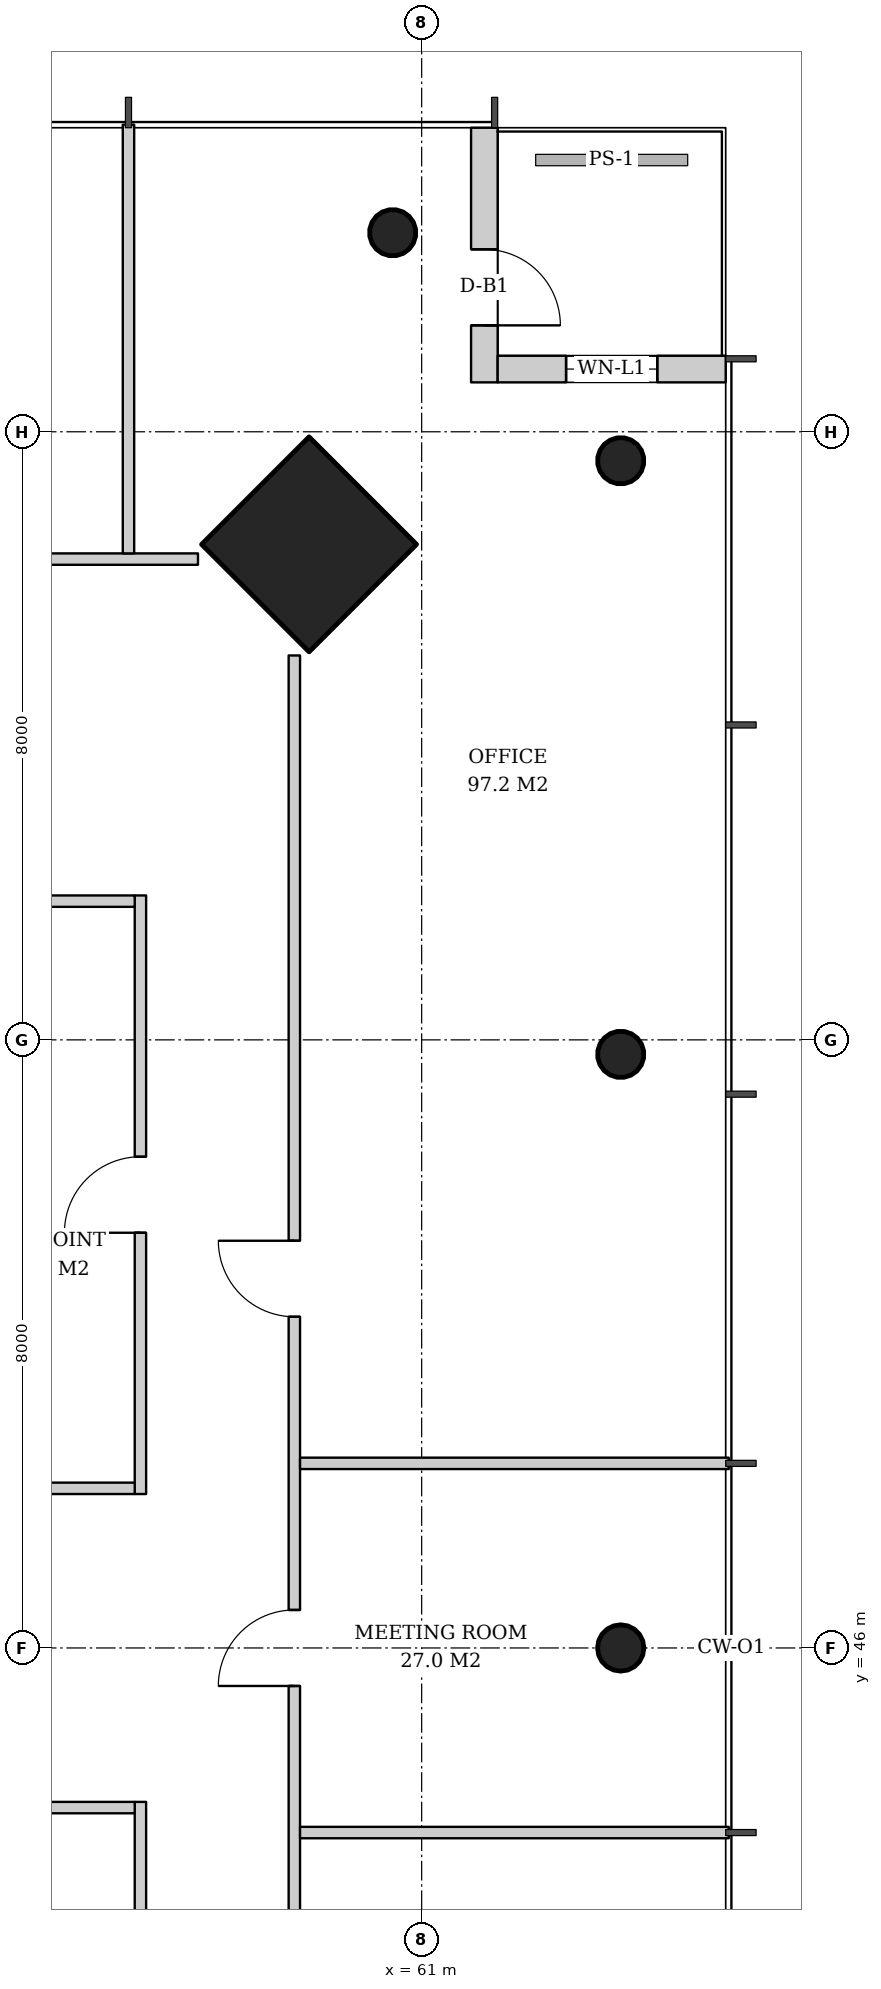
"""IFC4 building model, lengths in metres.
Left out: names, types, materials, properties, quantities, classifications, styles, units other than length and angle.
Written with IfcOpenShell. Run it as: python <this file> out.ifc"""

import sys

from ifc_helpers import new_model, si_unit, direction, frame, frame_2d, origin, origin_2d, place, context, subcontext, project, spatial, rectangle, hollow_circle, extrude, element, fill, save


model = new_model("IFC4")
c1 = context("Model", 3, precision=1e-05, world=origin(), true_north=direction((0.0, 1.0)))
c2 = subcontext(c1, "Body", "Model", "MODEL_VIEW")
j1 = project(units=[si_unit("LENGTHUNIT", "METRE"), si_unit("PLANEANGLEUNIT", "RADIAN")], contexts=[c1])
p1 = place(None, origin())
s1 = spatial("IfcSite", under=j1, at=p1, CompositionType="ELEMENT")
p2 = place(p1, origin())
s2 = spatial("IfcBuilding", under=s1, at=p2, CompositionType="ELEMENT")
p3 = place(p2, frame((0.0, 0.0, 188.2)))
s3 = spatial("IfcBuildingStorey", under=s2, at=p3, CompositionType="ELEMENT", Elevation=188.2)
p4 = place(p3, frame((59.557, 60.557, 0.0), z_axis=(-0.031898107953, -0.031898107953, 0.998981992539), x_axis=(0.707106781187, -0.707106781187, 0.0)))
e1 = element("IfcColumn", 1, at=p4, inside=s3, PredefinedType="COLUMN", context=c2, shape_type="SweptSolid", body=[
    extrude(rectangle(XDim=2.0, YDim=2.0, at=origin_2d()), origin(), (0.0, 0.0, 1.0), 3.804),
])
p5 = place(p3, frame((63.657, 61.657, 0.0), z_axis=(-0.031962158256, -0.031962158256, 0.998977898093), x_axis=(0.707106781187, -0.707106781187, 0.0)))
e2 = element("IfcColumn", 2, at=p5, inside=s3, PredefinedType="COLUMN", context=c2, shape_type="SweptSolid", body=[
    extrude(hollow_circle(Radius=0.305, WallThickness=0.025, at=origin_2d()), origin(), (0.0, 0.0, 1.0), 3.804),
])
p6 = place(p3, frame((63.657, 46.0, 0.0), z_axis=(-0.031978496719, 0.0, 0.999488557087), x_axis=(0.0, -1.0, 0.0)))
e3 = element("IfcColumn", 3, at=p6, inside=s3, PredefinedType="COLUMN", context=c2, shape_type="SweptSolid", body=[
    extrude(hollow_circle(Radius=0.305, WallThickness=0.025, at=origin_2d()), origin(), (0.0, 0.0, 1.0), 3.802),
])
p7 = place(p3, frame((63.657, 53.829, 0.0), z_axis=(-0.031974409754, -0.015987204877, 0.999360818924), x_axis=(0.4472135955, -0.894427191, 0.0)))
e4 = element("IfcColumn", 4, at=p7, inside=s3, PredefinedType="COLUMN", context=c2, shape_type="SweptSolid", body=[
    extrude(hollow_circle(Radius=0.305, WallThickness=0.025, at=origin_2d()), origin(), (0.0, 0.0, 1.0), 3.802),
])
p8 = place(p3, frame((60.657, 64.657, 0.0), z_axis=(-0.031962158256, -0.031962158256, 0.998977898093), x_axis=(0.707106781187, -0.707106781187, 0.0)))
e5 = element("IfcColumn", 5, at=p8, inside=s3, PredefinedType="COLUMN", context=c2, shape_type="SweptSolid", body=[
    extrude(hollow_circle(Radius=0.305, WallThickness=0.025, at=origin_2d()), origin(), (0.0, 0.0, 1.0), 3.804),
])
p9 = place(p3, frame((61.825, 66.0, 0.0), z_axis=(0.0, 0.0, 1.0), x_axis=(0.0, -1.0, 0.0)))
e6 = element("IfcWall", 6, at=p9, inside=s3, PredefinedType="SOLIDWALL", context=c2, shape_type="SweptSolid", body=[
    extrude(rectangle(XDim=3.35, YDim=0.35, at=frame_2d((1.675, 0.0))), origin(), (0.0, 0.0, 1.0), 3.62),
])
p10 = place(p9, frame((1.6, 0.0, 0.0)))
e7 = element("IfcOpeningElement", 7, at=p10, cuts=e6, PredefinedType="OPENING", context=c2, shape_type="SweptSolid", body=[
    extrude(rectangle(XDim=1.0, YDim=2.4, at=frame_2d((0.5, 1.2))), frame((0.0, 0.185, 0.0), z_axis=(0.0, -1.0, 0.0), x_axis=(1.0, 0.0, 0.0)), (0.0, 0.0, 1.0), 0.37),
])
p11 = place(p3, frame((62.0, 62.825, 0.0), z_axis=(0.0, 0.0, 1.0), x_axis=(1.0, 0.0, 0.0)))
e8 = element("IfcWall", 8, at=p11, inside=s3, PredefinedType="SOLIDWALL", context=c2, shape_type="SweptSolid", body=[
    extrude(rectangle(XDim=3.0, YDim=0.35, at=frame_2d((1.5, 0.0))), origin(), (0.0, 0.0, 1.0), 3.62),
])
p12 = place(p11, frame((0.9, 0.0, 0.6)))
e9 = element("IfcOpeningElement", 9, at=p12, cuts=e8, PredefinedType="OPENING", context=c2, shape_type="SweptSolid", body=[
    extrude(rectangle(XDim=1.2, YDim=2.55, at=frame_2d((0.6, 1.275))), frame((0.0, 0.185, 0.0), z_axis=(0.0, -1.0, 0.0), x_axis=(1.0, 0.0, 0.0)), (0.0, 0.0, 1.0), 0.37),
])
p13 = place(p3, frame((57.3, 36.1, 0.0), z_axis=(0.0, 0.0, 1.0), x_axis=(0.0, 1.0, 0.0)))
e10 = element("IfcWall", 10, at=p13, inside=s3, PredefinedType="PARTITIONING", context=c2, shape_type="SweptSolid", body=[
    extrude(rectangle(XDim=7.875, YDim=0.15, at=frame_2d((3.938, 0.0))), origin(), (0.0, 0.0, 1.0), 2.867),
])
p14 = place(p13, frame((3.438, 0.0, 0.0)))
e11 = element("IfcOpeningElement", 11, at=p14, cuts=e10, PredefinedType="OPENING", context=c2, shape_type="SweptSolid", body=[
    extrude(rectangle(XDim=1.0, YDim=2.1, at=frame_2d((0.5, 1.05))), frame((0.0, 0.085, 0.0), z_axis=(0.0, -1.0, 0.0), x_axis=(1.0, 0.0, 0.0)), (0.0, 0.0, 1.0), 0.17),
])
p15 = place(p3, frame((54.9, 43.9, 0.0), z_axis=(0.0, 0.0, 1.0), x_axis=(1.0, 0.0, 0.0)))
e12 = element("IfcWall", 12, at=p15, inside=s3, PredefinedType="PARTITIONING", context=c2, shape_type="SweptSolid", body=[
    extrude(rectangle(XDim=2.325, YDim=0.15, at=frame_2d((1.163, 0.0))), origin(), (0.0, 0.0, 1.0), 3.62),
])
p16 = place(p3, frame((57.3, 48.025, 0.0), z_axis=(0.0, 0.0, 1.0), x_axis=(0.0, 1.0, 0.0)))
e13 = element("IfcWall", 13, at=p16, inside=s3, PredefinedType="PARTITIONING", context=c2, shape_type="SweptSolid", body=[
    extrude(rectangle(XDim=7.875, YDim=0.15, at=frame_2d((3.938, 0.0))), origin(), (0.0, 0.0, 1.0), 2.867),
])
p17 = place(p16, frame((3.438, 0.0, 0.0)))
e14 = element("IfcOpeningElement", 14, at=p17, cuts=e13, PredefinedType="OPENING", context=c2, shape_type="SweptSolid", body=[
    extrude(rectangle(XDim=1.0, YDim=2.1, at=frame_2d((0.5, 1.05))), frame((0.0, 0.085, 0.0), z_axis=(0.0, -1.0, 0.0), x_axis=(1.0, 0.0, 0.0)), (0.0, 0.0, 1.0), 0.17),
])
for number, where, z_axis, x_axis in (
    (15, (54.9, 48.1, 0.0), (0.0, 0.0, 1.0), (1.0, 0.0, 0.0)),
    (16, (54.9, 55.825, 0.0), (0.0, 0.0, 1.0), (1.0, 0.0, 0.0)),
):
    element("IfcWall", number, at=place(p3, frame(where, z_axis=z_axis, x_axis=x_axis)), inside=s3, PredefinedType="PARTITIONING", context=c2, shape_type="SweptSolid", body=[
        extrude(rectangle(XDim=2.325, YDim=0.15, at=frame_2d((1.163, 0.0))), origin(), (0.0, 0.0, 1.0), 3.62),
    ])
p18 = place(p3, frame((59.325, 32.943, 0.0), z_axis=(0.0, 0.0, 1.0), x_axis=(0.0, 1.0, 0.0)))
e17 = element("IfcWall", 17, at=p18, inside=s3, PredefinedType="PARTITIONING", context=c2, shape_type="SweptSolid", body=[
    extrude(rectangle(XDim=26.114, YDim=0.15, at=frame_2d((13.057, 0.0))), origin(), (0.0, 0.0, 1.0), 2.867),
])
p19 = place(p18, frame((2.843, 0.0, 0.0)))
e18 = element("IfcOpeningElement", 18, at=p19, cuts=e17, PredefinedType="OPENING", context=c2, shape_type="SweptSolid", body=[
    extrude(rectangle(XDim=1.0, YDim=2.1, at=frame_2d((0.5, 1.05))), frame((0.0, 0.085, 0.0), z_axis=(0.0, -1.0, 0.0), x_axis=(1.0, 0.0, 0.0)), (0.0, 0.0, 1.0), 0.17),
])
p20 = place(p18, frame((7.7, 0.0, 0.0)))
e19 = element("IfcOpeningElement", 19, at=p20, cuts=e17, PredefinedType="OPENING", context=c2, shape_type="SweptSolid", body=[
    extrude(rectangle(XDim=1.0, YDim=2.1, at=frame_2d((0.5, 1.05))), frame((0.0, 0.085, 0.0), z_axis=(0.0, -1.0, 0.0), x_axis=(1.0, 0.0, 0.0)), (0.0, 0.0, 1.0), 0.17),
])
p21 = place(p18, frame((12.557, 0.0, 0.0)))
e20 = element("IfcOpeningElement", 20, at=p21, cuts=e17, PredefinedType="OPENING", context=c2, shape_type="SweptSolid", body=[
    extrude(rectangle(XDim=1.0, YDim=2.1, at=frame_2d((0.5, 1.05))), frame((0.0, 0.085, 0.0), z_axis=(0.0, -1.0, 0.0), x_axis=(1.0, 0.0, 0.0)), (0.0, 0.0, 1.0), 0.17),
])
p22 = place(p18, frame((17.414, 0.0, 0.0)))
e21 = element("IfcOpeningElement", 21, at=p22, cuts=e17, PredefinedType="OPENING", context=c2, shape_type="SweptSolid", body=[
    extrude(rectangle(XDim=1.0, YDim=2.1, at=frame_2d((0.5, 1.05))), frame((0.0, 0.085, 0.0), z_axis=(0.0, -1.0, 0.0), x_axis=(1.0, 0.0, 0.0)), (0.0, 0.0, 1.0), 0.17),
])
p23 = place(p3, frame((59.4, 43.572, 0.0), z_axis=(0.0, 0.0, 1.0), x_axis=(1.0, 0.0, 0.0)))
e22 = element("IfcWall", 22, at=p23, inside=s3, PredefinedType="PARTITIONING", context=c2, shape_type="SweptSolid", body=[
    extrude(rectangle(XDim=5.64, YDim=0.15, at=frame_2d((2.82, 0.0))), origin(), (0.0, 0.0, 1.0), 3.12),
])
p24 = place(p3, frame((59.4, 48.428, 0.0), z_axis=(0.0, 0.0, 1.0), x_axis=(1.0, 0.0, 0.0)))
e23 = element("IfcWall", 23, at=p24, inside=s3, PredefinedType="PARTITIONING", context=c2, shape_type="SweptSolid", body=[
    extrude(rectangle(XDim=5.64, YDim=0.15, at=frame_2d((2.82, 0.0))), origin(), (0.0, 0.0, 1.0), 2.867),
])
p25 = place(p3, frame((58.057, 60.325, 0.0), z_axis=(0.0, 0.0, 1.0), x_axis=(-1.0, 0.0, 0.0)))
e24 = element("IfcWall", 24, at=p25, inside=s3, PredefinedType="PARTITIONING", context=c2, shape_type="SweptSolid", body=[
    extrude(rectangle(XDim=26.114, YDim=0.15, at=frame_2d((13.057, 0.0))), origin(), (0.0, 0.0, 1.0), 2.867),
])
p26 = place(p25, frame((2.843, 0.0, 0.0)))
e25 = element("IfcOpeningElement", 25, at=p26, cuts=e24, PredefinedType="OPENING", context=c2, shape_type="SweptSolid", body=[
    extrude(rectangle(XDim=1.0, YDim=2.1, at=frame_2d((0.5, 1.05))), frame((0.0, 0.085, 0.0), z_axis=(0.0, -1.0, 0.0), x_axis=(1.0, 0.0, 0.0)), (0.0, 0.0, 1.0), 0.17),
])
p27 = place(p25, frame((7.7, 0.0, 0.0)))
e26 = element("IfcOpeningElement", 26, at=p27, cuts=e24, PredefinedType="OPENING", context=c2, shape_type="SweptSolid", body=[
    extrude(rectangle(XDim=1.0, YDim=2.1, at=frame_2d((0.5, 1.05))), frame((0.0, 0.085, 0.0), z_axis=(0.0, -1.0, 0.0), x_axis=(1.0, 0.0, 0.0)), (0.0, 0.0, 1.0), 0.17),
])
p28 = place(p25, frame((12.557, 0.0, 0.0)))
e27 = element("IfcOpeningElement", 27, at=p28, cuts=e24, PredefinedType="OPENING", context=c2, shape_type="SweptSolid", body=[
    extrude(rectangle(XDim=1.0, YDim=2.1, at=frame_2d((0.5, 1.05))), frame((0.0, 0.085, 0.0), z_axis=(0.0, -1.0, 0.0), x_axis=(1.0, 0.0, 0.0)), (0.0, 0.0, 1.0), 0.17),
])
p29 = place(p25, frame((17.414, 0.0, 0.0)))
e28 = element("IfcOpeningElement", 28, at=p29, cuts=e24, PredefinedType="OPENING", context=c2, shape_type="SweptSolid", body=[
    extrude(rectangle(XDim=1.0, YDim=2.1, at=frame_2d((0.5, 1.05))), frame((0.0, 0.085, 0.0), z_axis=(0.0, -1.0, 0.0), x_axis=(1.0, 0.0, 0.0)), (0.0, 0.0, 1.0), 0.17),
])
p30 = place(p3, frame((57.143, 60.4, 0.0), z_axis=(0.0, 0.0, 1.0), x_axis=(0.0, 1.0, 0.0)))
e29 = element("IfcWall", 29, at=p30, inside=s3, PredefinedType="PARTITIONING", context=c2, shape_type="SweptSolid", body=[
    extrude(rectangle(XDim=5.64, YDim=0.15, at=frame_2d((2.82, 0.0))), origin(), (0.0, 0.0, 1.0), 3.12),
])
p31 = place(p10, origin())
e30 = element("IfcDoor", 30, at=p31, inside=s3, OperationType="SINGLE_SWING_RIGHT", PredefinedType="DOOR", context=c2, shape_type="SweptSolid", body=[
    extrude(rectangle(XDim=1.0, YDim=2.4, at=frame_2d((0.5, 1.2))), frame((0.0, 0.025, 0.0), z_axis=(0.0, -1.0, 0.0), x_axis=(1.0, 0.0, 0.0)), (0.0, 0.0, 1.0), 0.05),
])
fill(e7, e30)
p32 = place(p12, origin())
e31 = element("IfcWindow", 31, at=p32, inside=s3, PartitioningType="SINGLE_PANEL", PredefinedType="WINDOW", context=c2, shape_type="SweptSolid", body=[
    extrude(rectangle(XDim=1.2, YDim=2.55, at=frame_2d((0.6, 1.275))), frame((0.0, 0.03, 0.0), z_axis=(0.0, -1.0, 0.0), x_axis=(1.0, 0.0, 0.0)), (0.0, 0.0, 1.0), 0.06),
])
fill(e9, e31)
p33 = place(p17, origin())
e32 = element("IfcDoor", 32, at=p33, inside=s3, OperationType="SINGLE_SWING_LEFT", PredefinedType="DOOR", context=c2, shape_type="SweptSolid", body=[
    extrude(rectangle(XDim=1.0, YDim=2.1, at=frame_2d((0.5, 1.05))), frame((0.0, 0.025, 0.0), z_axis=(0.0, -1.0, 0.0), x_axis=(1.0, 0.0, 0.0)), (0.0, 0.0, 1.0), 0.05),
])
fill(e14, e32)
p34 = place(p21, origin())
e33 = element("IfcDoor", 33, at=p34, inside=s3, OperationType="SINGLE_SWING_LEFT", PredefinedType="DOOR", context=c2, shape_type="SweptSolid", body=[
    extrude(rectangle(XDim=1.0, YDim=2.1, at=frame_2d((0.5, 1.05))), frame((0.0, 0.025, 0.0), z_axis=(0.0, -1.0, 0.0), x_axis=(1.0, 0.0, 0.0)), (0.0, 0.0, 1.0), 0.05),
])
fill(e20, e33)
p35 = place(p22, origin())
e34 = element("IfcDoor", 34, at=p35, inside=s3, OperationType="SINGLE_SWING_RIGHT", PredefinedType="DOOR", context=c2, shape_type="SweptSolid", body=[
    extrude(rectangle(XDim=1.0, YDim=2.1, at=frame_2d((0.5, 1.05))), frame((0.0, 0.025, 0.0), z_axis=(0.0, -1.0, 0.0), x_axis=(1.0, 0.0, 0.0)), (0.0, 0.0, 1.0), 0.05),
])
fill(e21, e34)
save(model, sys.argv[1])
